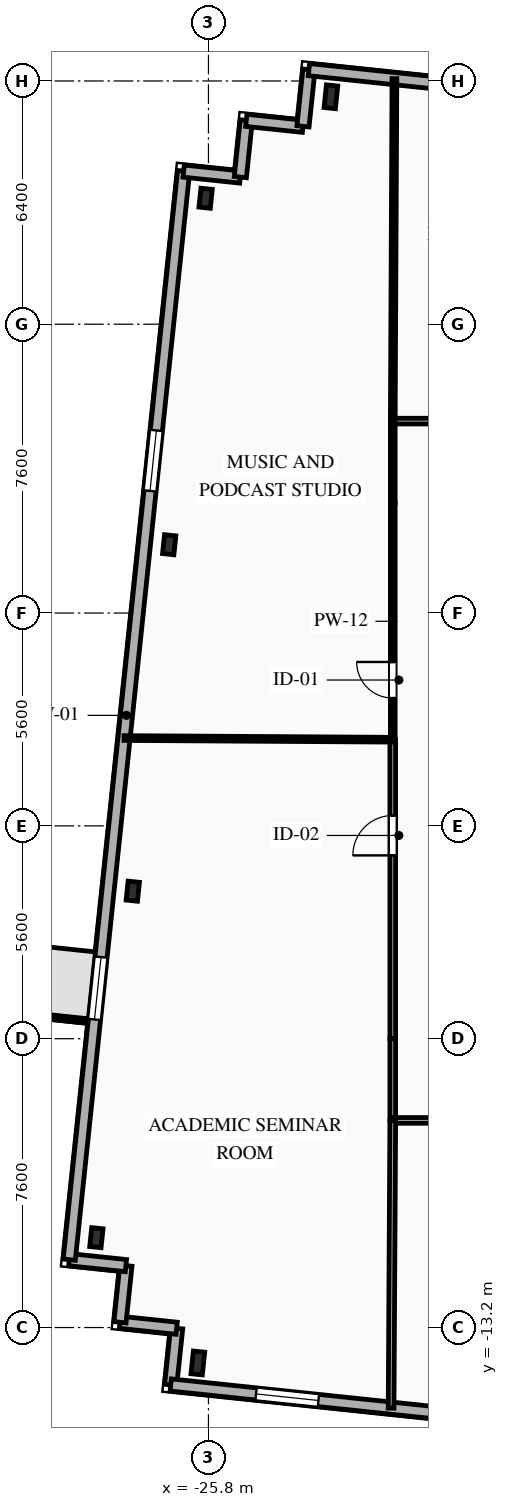
"""IFC4 building model, lengths in metres.
Left out: names, types, materials, properties, quantities, classifications, styles, units other than length and angle.
Written with IfcOpenShell. Run it as: python <this file> out.ifc"""

import sys

from ifc_helpers import new_model, si_unit, direction, frame, frame_2d, origin, origin_2d, place, context, subcontext, project, spatial, rectangle, i_section, extrude, element, fill, save


model = new_model("IFC4")
c1 = context("Model", 3, precision=1e-05, world=origin(), true_north=direction((0.0, 1.0)))
c2 = subcontext(c1, "Body", "Model", "MODEL_VIEW")
j1 = project(units=[si_unit("LENGTHUNIT", "METRE"), si_unit("PLANEANGLEUNIT", "RADIAN")], contexts=[c1])
p1 = place(None, origin())
s1 = spatial("IfcSite", under=j1, at=p1, CompositionType="ELEMENT")
p2 = place(p1, origin())
s2 = spatial("IfcBuilding", under=s1, at=p2, CompositionType="ELEMENT")
p3 = place(p2, frame((0.0, 0.0, 196.4)))
s3 = spatial("IfcBuildingStorey", under=s2, at=p3, CompositionType="ELEMENT", Elevation=196.4)
for number, where, z_axis, x_axis in (
    (1, (-26.079, -14.133, 0.0), (0.0, 0.0, 1.0), (0.995, -0.105, 0.0)),
    (2, (-22.577, 19.184, 0.0), (0.0, 0.0, 1.0), (0.995, -0.105, 0.0)),
):
    element("IfcColumn", number, at=place(p3, frame(where, z_axis=z_axis, x_axis=x_axis)), inside=s3, PredefinedType="COLUMN", context=c2, shape_type="SweptSolid", body=[
        extrude(i_section(OverallWidth=0.3, OverallDepth=0.6, WebThickness=0.015, FlangeThickness=0.03, FilletRadius=0.027, at=origin_2d()), origin(), (0.0, 0.0, 1.0), 3.35),
    ])
for number, where, z_axis, x_axis in (
    (3, (-25.875, 16.514, 0.0), (0.0, 0.0, 1.0), (0.995, -0.105, 0.0)),
    (4, (-26.833, 7.398, 0.0), (0.0, 0.0, 1.0), (0.995, -0.105, 0.0)),
    (5, (-27.791, -1.719, 0.0), (0.0, 0.0, 1.0), (0.995, -0.105, 0.0)),
    (6, (-28.749, -10.835, 0.0), (0.0, 0.0, 1.0), (0.995, -0.105, 0.0)),
):
    element("IfcColumn", number, at=place(p3, frame(where, z_axis=z_axis, x_axis=x_axis)), inside=s3, PredefinedType="COLUMN", context=c2, shape_type="SweptSolid", body=[
        extrude(i_section(OverallWidth=0.3, OverallDepth=0.5, WebThickness=0.014, FlangeThickness=0.028, FilletRadius=0.027, at=origin_2d()), origin(), (0.0, 0.0, 1.0), 3.35),
    ])
for number, where, z_axis, x_axis in (
    (7, (-26.793, -14.711, 0.0), (0.0, 0.0, 1.0), (0.104, 0.995, 0.0)),
    (8, (-26.637, -13.219, 0.0), (0.0, 0.0, 1.0), (-0.995, 0.104, 0.0)),
):
    element("IfcWall", number, at=place(p3, frame(where, z_axis=z_axis, x_axis=x_axis)), inside=s3, PredefinedType="SOLIDWALL", context=c2, shape_type="SweptSolid", body=[
        extrude(rectangle(XDim=1.5, YDim=0.32, at=frame_2d((0.75, 0.0))), origin(), (0.0, 0.0, 1.0), 3.04),
    ])
p4 = place(p3, frame((-28.128, -13.062, 0.0), z_axis=(0.0, 0.0, 1.0), x_axis=(0.104481464157, 0.994526834051, 0.0)))
e9 = element("IfcWall", 9, at=p4, inside=s3, PredefinedType="SOLIDWALL", context=c2, shape_type="SweptSolid", body=[
    extrude(rectangle(XDim=1.5, YDim=0.32, at=frame_2d((0.75, 0.0))), origin(), (0.0, 0.0, 1.0), 3.04),
])
p5 = place(p3, frame((-27.972, -11.571, 0.0), z_axis=(0.0, 0.0, 1.0), x_axis=(-0.994525057048, 0.104498377516, 0.0)))
e10 = element("IfcWall", 10, at=p5, inside=s3, PredefinedType="SOLIDWALL", context=c2, shape_type="SweptSolid", body=[
    extrude(rectangle(XDim=1.5, YDim=0.32, at=frame_2d((0.75, 0.0))), origin(), (0.0, 0.0, 1.0), 3.04),
])
p6 = place(p3, frame((-29.463, -11.414, 0.0), z_axis=(0.0, 0.0, 1.0), x_axis=(0.104530779244, 0.994521651947, 0.0)))
e11 = element("IfcWall", 11, at=p6, inside=s3, PredefinedType="SOLIDWALL", context=c2, shape_type="SweptSolid", body=[
    extrude(rectangle(XDim=28.8, YDim=0.32, at=frame_2d((14.4, 0.0))), origin(), (0.0, 0.0, 1.0), 3.04),
])
p7 = place(p6, frame((6.355, 0.0, 0.85)))
e12 = element("IfcOpeningElement", 12, at=p7, cuts=e11, PredefinedType="OPENING", context=c2, shape_type="SweptSolid", body=[
    extrude(rectangle(XDim=1.65, YDim=1.85, at=frame_2d((0.825, 0.925))), frame((0.0, 0.17, 0.0), z_axis=(0.0, -1.0, 0.0), x_axis=(1.0, 0.0, 0.0)), (0.0, 0.0, 1.0), 0.34),
])
p8 = place(p6, frame((20.339, 0.0, 0.85)))
e13 = element("IfcOpeningElement", 13, at=p8, cuts=e11, PredefinedType="OPENING", context=c2, shape_type="SweptSolid", body=[
    extrude(rectangle(XDim=1.6, YDim=1.85, at=frame_2d((0.8, 0.925))), frame((0.0, 0.17, 0.0), z_axis=(0.0, -1.0, 0.0), x_axis=(1.0, 0.0, 0.0)), (0.0, 0.0, 1.0), 0.34),
])
p9 = place(p3, frame((-26.453, 17.229, 0.0), z_axis=(0.0, 0.0, 1.0), x_axis=(0.994508128223, -0.104659366031, 0.0)))
e14 = element("IfcWall", 14, at=p9, inside=s3, PredefinedType="SOLIDWALL", context=c2, shape_type="SweptSolid", body=[
    extrude(rectangle(XDim=1.5, YDim=0.32, at=frame_2d((0.75, 0.0))), origin(), (0.0, 0.0, 1.0), 3.04),
])
p10 = place(p3, frame((-24.961, 17.072, 0.0), z_axis=(0.0, 0.0, 1.0), x_axis=(0.104642427191, 0.994509910675, 0.0)))
e15 = element("IfcWall", 15, at=p10, inside=s3, PredefinedType="SOLIDWALL", context=c2, shape_type="SweptSolid", body=[
    extrude(rectangle(XDim=1.5, YDim=0.32, at=frame_2d((0.75, 0.0))), origin(), (0.0, 0.0, 1.0), 3.04),
])
p11 = place(p3, frame((-24.804, 18.563, 0.0), z_axis=(0.0, 0.0, 1.0), x_axis=(0.994508128223, -0.104659366031, 0.0)))
e16 = element("IfcWall", 16, at=p11, inside=s3, PredefinedType="SOLIDWALL", context=c2, shape_type="SweptSolid", body=[
    extrude(rectangle(XDim=1.5, YDim=0.32, at=frame_2d((0.75, 0.0))), origin(), (0.0, 0.0, 1.0), 3.04),
])
p12 = place(p3, frame((-23.312, 18.406, 0.0), z_axis=(0.0, 0.0, 1.0), x_axis=(0.104481464157, 0.994526834051, 0.0)))
e17 = element("IfcWall", 17, at=p12, inside=s3, PredefinedType="SOLIDWALL", context=c2, shape_type="SweptSolid", body=[
    extrude(rectangle(XDim=1.5, YDim=0.32, at=frame_2d((0.75, 0.0))), origin(), (0.0, 0.0, 1.0), 3.04),
])
p13 = place(p3, frame((-23.156, 19.898, 0.0), z_axis=(0.0, 0.0, 1.0), x_axis=(0.994522001802, -0.104527450613, 0.0)))
e18 = element("IfcWall", 18, at=p13, inside=s3, PredefinedType="SOLIDWALL", context=c2, shape_type="SweptSolid", body=[
    extrude(rectangle(XDim=45.8, YDim=0.32, at=frame_2d((22.9, 0.0))), origin(), (0.0, 0.0, 1.0), 3.04),
])
p14 = place(p13, frame((4.139, 0.0, 0.85)))
e19 = element("IfcOpeningElement", 19, at=p14, cuts=e18, PredefinedType="OPENING", context=c2, shape_type="SweptSolid", body=[
    extrude(rectangle(XDim=1.65, YDim=1.85, at=frame_2d((0.825, 0.925))), frame((0.0, 0.17, 0.0), z_axis=(0.0, -1.0, 0.0), x_axis=(1.0, 0.0, 0.0)), (0.0, 0.0, 1.0), 0.34),
])
p15 = place(p13, frame((9.384, 0.0, 0.85)))
e20 = element("IfcOpeningElement", 20, at=p15, cuts=e18, PredefinedType="OPENING", context=c2, shape_type="SweptSolid", body=[
    extrude(rectangle(XDim=1.65, YDim=1.85, at=frame_2d((0.825, 0.925))), frame((0.0, 0.17, 0.0), z_axis=(0.0, -1.0, 0.0), x_axis=(1.0, 0.0, 0.0)), (0.0, 0.0, 1.0), 0.34),
])
p16 = place(p13, frame((18.497, 0.0, 0.85)))
e21 = element("IfcOpeningElement", 21, at=p16, cuts=e18, PredefinedType="OPENING", context=c2, shape_type="SweptSolid", body=[
    extrude(rectangle(XDim=1.6, YDim=1.85, at=frame_2d((0.8, 0.925))), frame((0.0, 0.17, 0.0), z_axis=(0.0, -1.0, 0.0), x_axis=(1.0, 0.0, 0.0)), (0.0, 0.0, 1.0), 0.34),
])
p17 = place(p13, frame((27.525, 0.0, 0.85)))
e22 = element("IfcOpeningElement", 22, at=p17, cuts=e18, PredefinedType="OPENING", context=c2, shape_type="SweptSolid", body=[
    extrude(rectangle(XDim=2.2, YDim=1.85, at=frame_2d((1.1, 0.925))), frame((0.0, 0.17, 0.0), z_axis=(0.0, -1.0, 0.0), x_axis=(1.0, 0.0, 0.0)), (0.0, 0.0, 1.0), 0.34),
])
p18 = place(p13, frame((38.329, 0.0, 0.85)))
e23 = element("IfcOpeningElement", 23, at=p18, cuts=e18, PredefinedType="OPENING", context=c2, shape_type="SweptSolid", body=[
    extrude(rectangle(XDim=1.65, YDim=1.85, at=frame_2d((0.825, 0.925))), frame((0.0, 0.17, 0.0), z_axis=(0.0, -1.0, 0.0), x_axis=(1.0, 0.0, 0.0)), (0.0, 0.0, 1.0), 0.34),
])
p19 = place(p3, frame((-9.588, -16.519, 0.0), z_axis=(0.0, 0.0, 1.0), x_axis=(-0.994521911171, 0.104528312915, 0.0)))
e24 = element("IfcWall", 24, at=p19, inside=s3, PredefinedType="SOLIDWALL", context=c2, shape_type="SweptSolid", body=[
    extrude(rectangle(XDim=17.3, YDim=0.32, at=frame_2d((8.65, 0.0))), origin(), (0.0, 0.0, 1.0), 3.04),
])
p20 = place(p19, frame((4.717, 0.0, 0.85)))
e25 = element("IfcOpeningElement", 25, at=p20, cuts=e24, PredefinedType="OPENING", context=c2, shape_type="SweptSolid", body=[
    extrude(rectangle(XDim=2.4, YDim=1.95, at=frame_2d((1.2, 0.975))), frame((0.0, 0.17, 0.0), z_axis=(0.0, -1.0, 0.0), x_axis=(1.0, 0.0, 0.0)), (0.0, 0.0, 1.0), 0.34),
])
p21 = place(p19, frame((13.392, 0.0, 0.85)))
e26 = element("IfcOpeningElement", 26, at=p21, cuts=e24, PredefinedType="OPENING", context=c2, shape_type="SweptSolid", body=[
    extrude(rectangle(XDim=1.65, YDim=1.85, at=frame_2d((0.825, 0.925))), frame((0.0, 0.17, 0.0), z_axis=(0.0, -1.0, 0.0), x_axis=(1.0, 0.0, 0.0)), (0.0, 0.0, 1.0), 0.34),
])
p22 = place(p3, frame((-20.95, 8.5, 0.0), z_axis=(0.0, 0.0, 1.0), x_axis=(0.0, 1.0, 0.0)))
e27 = element("IfcWall", 27, at=p22, inside=s3, PredefinedType="PARTITIONING", context=c2, shape_type="SweptSolid", body=[
    extrude(rectangle(XDim=2.15, YDim=0.125, at=frame_2d((1.075, 0.0))), origin(), (0.0, 0.0, 1.0), 3.04),
])
p23 = place(p3, frame((-20.95, 10.65, 0.0), z_axis=(0.0, 0.0, 1.0), x_axis=(1.0, 0.0, 0.0)))
e28 = element("IfcWall", 28, at=p23, inside=s3, PredefinedType="PARTITIONING", context=c2, shape_type="SweptSolid", body=[
    extrude(rectangle(XDim=5.238, YDim=0.15, at=frame_2d((2.619, 0.0))), origin(), (0.0, 0.0, 1.0), 3.04),
])
p24 = place(p23, frame((3.229, 0.0, 0.0)))
e29 = element("IfcOpeningElement", 29, at=p24, cuts=e28, PredefinedType="OPENING", context=c2, shape_type="SweptSolid", body=[
    extrude(rectangle(XDim=1.05, YDim=2.15, at=frame_2d((0.525, 1.075))), frame((0.0, 0.085, 0.0), z_axis=(0.0, -1.0, 0.0), x_axis=(1.0, 0.0, 0.0)), (0.0, 0.0, 1.0), 0.17),
])
p25 = place(p3, frame((-20.95, -7.75, 0.0), z_axis=(0.0, 0.0, 1.0), x_axis=(0.0, 1.0, 0.0)))
e30 = element("IfcWall", 30, at=p25, inside=s3, PredefinedType="PARTITIONING", context=c2, shape_type="SweptSolid", body=[
    extrude(rectangle(XDim=2.15, YDim=0.15, at=frame_2d((1.075, 0.0))), origin(), (0.0, 0.0, 1.0), 3.04),
])
p26 = place(p3, frame((-6.983, -7.75, 0.0), z_axis=(0.0, 0.0, 1.0), x_axis=(-1.0, 0.0, 0.0)))
e31 = element("IfcWall", 31, at=p26, inside=s3, PredefinedType="PARTITIONING", context=c2, shape_type="SweptSolid", body=[
    extrude(rectangle(XDim=13.967, YDim=0.15, at=frame_2d((6.983, 0.0))), origin(), (0.0, 0.0, 1.0), 3.04),
])
p27 = place(p26, frame((6.458, 0.0, 0.0)))
e32 = element("IfcOpeningElement", 32, at=p27, cuts=e31, PredefinedType="OPENING", context=c2, shape_type="SweptSolid", body=[
    extrude(rectangle(XDim=1.05, YDim=2.15, at=frame_2d((0.525, 1.075))), frame((0.0, 0.085, 0.0), z_axis=(0.0, -1.0, 0.0), x_axis=(1.0, 0.0, 0.0)), (0.0, 0.0, 1.0), 0.17),
])
p28 = place(p3, frame((-20.95, -5.6, 0.0), z_axis=(0.0, 0.0, 1.0), x_axis=(0.0, 1.0, 0.0)))
e33 = element("IfcWall", 33, at=p28, inside=s3, PredefinedType="PARTITIONING", context=c2, shape_type="SweptSolid", body=[
    extrude(rectangle(XDim=7.867, YDim=0.15, at=frame_2d((3.934, 0.0))), origin(), (0.0, 0.0, 1.0), 3.04),
])
p29 = place(p28, frame((4.823, 0.0, 0.0)))
e34 = element("IfcOpeningElement", 34, at=p29, cuts=e33, PredefinedType="OPENING", context=c2, shape_type="SweptSolid", body=[
    extrude(rectangle(XDim=1.05, YDim=2.15, at=frame_2d((0.525, 1.075))), frame((0.0, 0.085, 0.0), z_axis=(0.0, -1.0, 0.0), x_axis=(1.0, 0.0, 0.0)), (0.0, 0.0, 1.0), 0.17),
])
p30 = place(p3, frame((-20.95, 2.267, 0.0), z_axis=(0.0, 0.0, 1.0), x_axis=(0.0, 1.0, 0.0)))
e35 = element("IfcWall", 35, at=p30, inside=s3, PredefinedType="PARTITIONING", context=c2, shape_type="SweptSolid", body=[
    extrude(rectangle(XDim=6.233, YDim=0.125, at=frame_2d((3.116, 0.0))), origin(), (0.0, 0.0, 1.0), 3.04),
])
p31 = place(p30, frame((1.095, 0.0, 0.0)))
e36 = element("IfcOpeningElement", 36, at=p31, cuts=e35, PredefinedType="OPENING", context=c2, shape_type="SweptSolid", body=[
    extrude(rectangle(XDim=0.95, YDim=2.1, at=frame_2d((0.475, 1.05))), frame((0.0, 0.073, 0.0), z_axis=(0.0, -1.0, 0.0), x_axis=(1.0, 0.0, 0.0)), (0.0, 0.0, 1.0), 0.145),
])
p32 = place(p3, frame((-28.021, 2.311, 0.0), z_axis=(0.0, 0.0, 1.0), x_axis=(0.99998090118, -0.006180394355, 0.0)))
e37 = element("IfcWall", 37, at=p32, inside=s3, PredefinedType="PARTITIONING", context=c2, shape_type="SweptSolid", body=[
    extrude(rectangle(XDim=7.071, YDim=0.125, at=frame_2d((3.536, 0.0))), origin(), (0.0, 0.0, 1.0), 3.04),
])
p33 = place(p3, frame((-20.95, -7.75, 0.0), z_axis=(0.0, 0.0, 1.0), x_axis=(-0.005804668564, -0.99998315277, 0.0)))
e38 = element("IfcWall", 38, at=p33, inside=s3, PredefinedType="PARTITIONING", context=c2, shape_type="SweptSolid", body=[
    extrude(rectangle(XDim=7.571, YDim=0.15, at=frame_2d((3.785, 0.0))), origin(), (0.0, 0.0, 1.0), 3.04),
])
p34 = place(p3, frame((-20.906, 19.662, 0.0), z_axis=(0.0, 0.0, 1.0), x_axis=(-0.004876272857, -0.999988110911, 0.0)))
e39 = element("IfcWall", 39, at=p34, inside=s3, PredefinedType="PARTITIONING", context=c2, shape_type="SweptSolid", body=[
    extrude(rectangle(XDim=9.012, YDim=0.125, at=frame_2d((4.506, 0.0))), origin(), (0.0, 0.0, 1.0), 2.665),
])
p35 = place(p7, origin())
e40 = element("IfcWindow", 40, at=p35, inside=s3, PartitioningType="SINGLE_PANEL", PredefinedType="WINDOW", context=c2, shape_type="SweptSolid", body=[
    extrude(rectangle(XDim=1.65, YDim=1.85, at=frame_2d((0.825, 0.925))), frame((0.0, 0.03, 0.0), z_axis=(0.0, -1.0, 0.0), x_axis=(1.0, 0.0, 0.0)), (0.0, 0.0, 1.0), 0.06),
])
fill(e12, e40)
p36 = place(p8, origin())
e41 = element("IfcWindow", 41, at=p36, inside=s3, PartitioningType="SINGLE_PANEL", PredefinedType="WINDOW", context=c2, shape_type="SweptSolid", body=[
    extrude(rectangle(XDim=1.6, YDim=1.85, at=frame_2d((0.8, 0.925))), frame((0.0, 0.03, 0.0), z_axis=(0.0, -1.0, 0.0), x_axis=(1.0, 0.0, 0.0)), (0.0, 0.0, 1.0), 0.06),
])
fill(e13, e41)
p37 = place(p21, origin())
e42 = element("IfcWindow", 42, at=p37, inside=s3, PartitioningType="SINGLE_PANEL", PredefinedType="WINDOW", context=c2, shape_type="SweptSolid", body=[
    extrude(rectangle(XDim=1.65, YDim=1.85, at=frame_2d((0.825, 0.925))), frame((0.0, 0.03, 0.0), z_axis=(0.0, -1.0, 0.0), x_axis=(1.0, 0.0, 0.0)), (0.0, 0.0, 1.0), 0.06),
])
fill(e26, e42)
p38 = place(p29, origin())
e43 = element("IfcDoor", 43, at=p38, inside=s3, OperationType="SINGLE_SWING_LEFT", PredefinedType="DOOR", context=c2, shape_type="SweptSolid", body=[
    extrude(rectangle(XDim=1.05, YDim=2.15, at=frame_2d((0.525, 1.075))), frame((0.0, 0.025, 0.0), z_axis=(0.0, -1.0, 0.0), x_axis=(1.0, 0.0, 0.0)), (0.0, 0.0, 1.0), 0.05),
])
fill(e34, e43)
p39 = place(p31, origin())
e44 = element("IfcDoor", 44, at=p39, inside=s3, OperationType="SINGLE_SWING_RIGHT", PredefinedType="DOOR", context=c2, shape_type="SweptSolid", body=[
    extrude(rectangle(XDim=0.95, YDim=2.1, at=frame_2d((0.475, 1.05))), frame((0.0, 0.025, 0.0), z_axis=(0.0, -1.0, 0.0), x_axis=(1.0, 0.0, 0.0)), (0.0, 0.0, 1.0), 0.05),
])
fill(e36, e44)
save(model, sys.argv[1])
